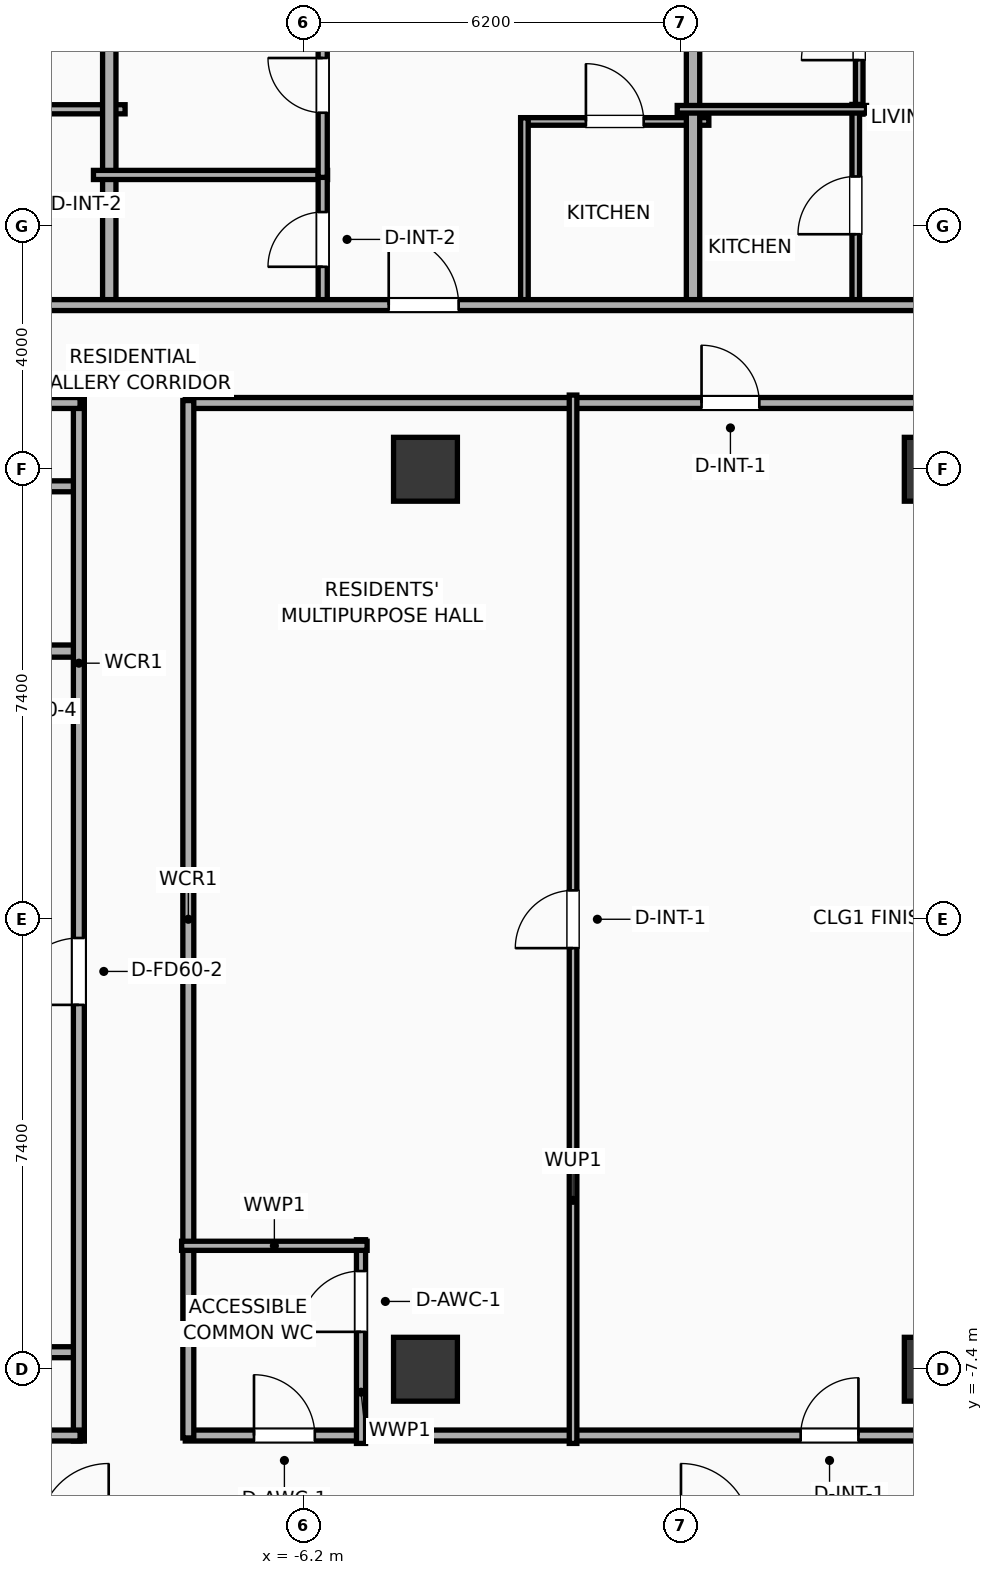
"""IFC4 building model, lengths in metres.
Left out: names, types, materials, properties, quantities, classifications, styles, units other than length and angle.
Written with IfcOpenShell. Run it as: python <this file> out.ifc"""

import sys

from ifc_helpers import new_model, si_unit, direction, frame, frame_2d, origin, origin_2d, place, context, subcontext, project, spatial, rectangle, extrude, element, fill, save


model = new_model("IFC4")
c1 = context("Model", 3, precision=1e-05, world=origin(), true_north=direction((0.0, 1.0)))
c2 = subcontext(c1, "Body", "Model", "MODEL_VIEW")
j1 = project(units=[si_unit("LENGTHUNIT", "METRE"), si_unit("PLANEANGLEUNIT", "RADIAN")], contexts=[c1])
p1 = place(None, origin())
s1 = spatial("IfcSite", under=j1, at=p1, CompositionType="ELEMENT")
p2 = place(p1, origin())
s2 = spatial("IfcBuilding", under=s1, at=p2, CompositionType="ELEMENT")
p3 = place(p2, frame((0.0, 0.0, 101.4)))
s3 = spatial("IfcBuildingStorey", under=s2, at=p3, CompositionType="ELEMENT", Elevation=101.4)
for number, where, z_axis, x_axis in (
    (1, (-4.2, -7.4, 0.0), (0.0, 0.0, 1.0), (1.0, 0.0, 0.0)),
    (2, (-4.2, 7.4, 0.0), (0.0, 0.0, 1.0), (1.0, 0.0, 0.0)),
    (3, (4.2, -7.4, 0.0), (0.0, 0.0, 1.0), (1.0, 0.0, 0.0)),
    (4, (4.2, 7.4, 0.0), (0.0, 0.0, 1.0), (1.0, 0.0, 0.0)),
):
    element("IfcColumn", number, at=place(p3, frame(where, z_axis=z_axis, x_axis=x_axis)), inside=s3, PredefinedType="COLUMN", context=c2, shape_type="SweptSolid", body=[
        extrude(rectangle(XDim=1.05, YDim=1.05, at=origin_2d()), origin(), (0.0, 0.0, 1.0), 3.9),
    ])
p4 = place(p3, frame((-12.15, 4.41, 0.0), z_axis=(0.0, 0.0, 1.0), x_axis=(1.0, 0.0, 0.0)))
e5 = element("IfcWall", 5, at=p4, inside=s3, PredefinedType="PARTITIONING", context=c2, shape_type="SweptSolid", body=[
    extrude(rectangle(XDim=2.27, YDim=0.2, at=frame_2d((1.135, 0.0))), origin(), (0.0, 0.0, 1.0), 3.65),
])
p5 = place(p4, frame((0.685, 0.0, 0.0)))
e6 = element("IfcOpeningElement", 6, at=p5, cuts=e5, PredefinedType="OPENING", context=c2, shape_type="SweptSolid", body=[
    extrude(rectangle(XDim=0.9, YDim=2.05, at=frame_2d((0.45, 1.025))), frame((0.0, 0.11, 0.0), z_axis=(0.0, -1.0, 0.0), x_axis=(1.0, 0.0, 0.0)), (0.0, 0.0, 1.0), 0.22),
])
for number, where, z_axis, x_axis in (
    (7, (-12.15, 7.12, 0.0), (0.0, 0.0, 1.0), (1.0, 0.0, 0.0)),
    (8, (-12.15, -7.12, 0.0), (0.0, 0.0, 1.0), (1.0, 0.0, 0.0)),
):
    element("IfcWall", number, at=place(p3, frame(where, z_axis=z_axis, x_axis=x_axis)), inside=s3, PredefinedType="PARTITIONING", context=c2, shape_type="SweptSolid", body=[
        extrude(rectangle(XDim=2.27, YDim=0.18, at=frame_2d((1.135, 0.0))), origin(), (0.0, 0.0, 1.0), 3.65),
    ])
p6 = place(p3, frame((-9.9, -8.58, 0.0), z_axis=(0.0, 0.0, 1.0), x_axis=(0.0, 1.0, 0.0)))
e9 = element("IfcWall", 9, at=p6, inside=s3, PredefinedType="PARTITIONING", context=c2, shape_type="SweptSolid", body=[
    extrude(rectangle(XDim=17.16, YDim=0.18, at=frame_2d((8.58, 0.0))), origin(), (0.0, 0.0, 1.0), 3.65),
])
p7 = place(p6, frame((7.172, 0.0, 0.0)))
e10 = element("IfcOpeningElement", 10, at=p7, cuts=e9, PredefinedType="OPENING", context=c2, shape_type="SweptSolid", body=[
    extrude(rectangle(XDim=1.1, YDim=2.05, at=frame_2d((0.55, 1.025))), frame((0.0, 0.1, 0.0), z_axis=(0.0, -1.0, 0.0), x_axis=(1.0, 0.0, 0.0)), (0.0, 0.0, 1.0), 0.2),
])
p8 = place(p3, frame((-29.21, 8.49, 0.0), z_axis=(0.0, 0.0, 1.0), x_axis=(1.0, 0.0, 0.0)))
e11 = element("IfcWall", 11, at=p8, inside=s3, PredefinedType="PARTITIONING", context=c2, shape_type="SweptSolid", body=[
    extrude(rectangle(XDim=19.33, YDim=0.18, at=frame_2d((9.665, 0.0))), origin(), (0.0, 0.0, 1.0), 3.65),
])
p9 = place(p8, frame((2.065, 0.0, 0.0)))
e12 = element("IfcOpeningElement", 12, at=p9, cuts=e11, PredefinedType="OPENING", context=c2, shape_type="SweptSolid", body=[
    extrude(rectangle(XDim=1.15, YDim=2.05, at=frame_2d((0.575, 1.025))), frame((0.0, 0.1, 0.0), z_axis=(0.0, -1.0, 0.0), x_axis=(1.0, 0.0, 0.0)), (0.0, 0.0, 1.0), 0.2),
])
p10 = place(p3, frame((-29.21, -8.49, 0.0), z_axis=(0.0, 0.0, 1.0), x_axis=(1.0, 0.0, 0.0)))
e13 = element("IfcWall", 13, at=p10, inside=s3, PredefinedType="PARTITIONING", context=c2, shape_type="SweptSolid", body=[
    extrude(rectangle(XDim=19.33, YDim=0.18, at=frame_2d((9.665, 0.0))), origin(), (0.0, 0.0, 1.0), 3.65),
])
p11 = place(p3, frame((-8.15, 8.49, 0.0), z_axis=(0.0, 0.0, 1.0), x_axis=(1.0, 0.0, 0.0)))
e14 = element("IfcWall", 14, at=p11, inside=s3, PredefinedType="PARTITIONING", context=c2, shape_type="SweptSolid", body=[
    extrude(rectangle(XDim=16.3, YDim=0.18, at=frame_2d((8.15, 0.0))), origin(), (0.0, 0.0, 1.0), 3.65),
])
p12 = place(p11, frame((8.49, 0.0, 0.0)))
e15 = element("IfcOpeningElement", 15, at=p12, cuts=e14, PredefinedType="OPENING", context=c2, shape_type="SweptSolid", body=[
    extrude(rectangle(XDim=0.95, YDim=2.05, at=frame_2d((0.475, 1.025))), frame((0.0, 0.1, 0.0), z_axis=(0.0, -1.0, 0.0), x_axis=(1.0, 0.0, 0.0)), (0.0, 0.0, 1.0), 0.2),
])
p13 = place(p3, frame((-8.15, -8.49, 0.0), z_axis=(0.0, 0.0, 1.0), x_axis=(1.0, 0.0, 0.0)))
e16 = element("IfcWall", 16, at=p13, inside=s3, PredefinedType="PARTITIONING", context=c2, shape_type="SweptSolid", body=[
    extrude(rectangle(XDim=16.3, YDim=0.18, at=frame_2d((8.15, 0.0))), origin(), (0.0, 0.0, 1.0), 3.65),
])
p14 = place(p13, frame((1.13, 0.0, 0.0)))
e17 = element("IfcOpeningElement", 17, at=p14, cuts=e16, PredefinedType="OPENING", context=c2, shape_type="SweptSolid", body=[
    extrude(rectangle(XDim=1.0, YDim=2.05, at=frame_2d((0.5, 1.025))), frame((0.0, 0.1, 0.0), z_axis=(0.0, -1.0, 0.0), x_axis=(1.0, 0.0, 0.0)), (0.0, 0.0, 1.0), 0.2),
])
p15 = place(p13, frame((10.12, 0.0, 0.0)))
e18 = element("IfcOpeningElement", 18, at=p15, cuts=e16, PredefinedType="OPENING", context=c2, shape_type="SweptSolid", body=[
    extrude(rectangle(XDim=0.95, YDim=2.05, at=frame_2d((0.475, 1.025))), frame((0.0, 0.1, 0.0), z_axis=(0.0, -1.0, 0.0), x_axis=(1.0, 0.0, 0.0)), (0.0, 0.0, 1.0), 0.2),
])
p16 = place(p3, frame((-8.1, -8.53, 0.0), z_axis=(0.0, 0.0, 1.0), x_axis=(0.0, 1.0, 0.0)))
e19 = element("IfcWall", 19, at=p16, inside=s3, PredefinedType="PARTITIONING", context=c2, shape_type="SweptSolid", body=[
    extrude(rectangle(XDim=17.06, YDim=0.18, at=frame_2d((8.53, 0.0))), origin(), (0.0, 0.0, 1.0), 3.65),
])
p17 = place(p3, frame((-5.26, -8.62, 0.0), z_axis=(0.0, 0.0, 1.0), x_axis=(0.0, 1.0, 0.0)))
e20 = element("IfcWall", 20, at=p17, inside=s3, PredefinedType="PLUMBINGWALL", context=c2, shape_type="SweptSolid", body=[
    extrude(rectangle(XDim=3.35, YDim=0.15, at=frame_2d((1.675, 0.0))), origin(), (0.0, 0.0, 1.0), 3.65),
])
p18 = place(p17, frame((1.835, 0.0, 0.0)))
e21 = element("IfcOpeningElement", 21, at=p18, cuts=e20, PredefinedType="OPENING", context=c2, shape_type="SweptSolid", body=[
    extrude(rectangle(XDim=1.0, YDim=2.05, at=frame_2d((0.5, 1.025))), frame((0.0, 0.085, 0.0), z_axis=(0.0, -1.0, 0.0), x_axis=(1.0, 0.0, 0.0)), (0.0, 0.0, 1.0), 0.17),
])
p19 = place(p3, frame((-8.21, -5.37, 0.0), z_axis=(0.0, 0.0, 1.0), x_axis=(1.0, 0.0, 0.0)))
e22 = element("IfcWall", 22, at=p19, inside=s3, PredefinedType="PLUMBINGWALL", context=c2, shape_type="SweptSolid", body=[
    extrude(rectangle(XDim=3.05, YDim=0.15, at=frame_2d((1.525, 0.0))), origin(), (0.0, 0.0, 1.0), 3.65),
])
p20 = place(p3, frame((-1.773, -8.62, 0.0), z_axis=(0.0, 0.0, 1.0), x_axis=(0.0, 1.0, 0.0)))
e23 = element("IfcWall", 23, at=p20, inside=s3, PredefinedType="PARTITIONING", context=c2, shape_type="SweptSolid", body=[
    extrude(rectangle(XDim=17.24, YDim=0.125, at=frame_2d((8.62, 0.0))), origin(), (0.0, 0.0, 1.0), 3.65),
])
p21 = place(p20, frame((8.145, 0.0, 0.0)))
e24 = element("IfcOpeningElement", 24, at=p21, cuts=e23, PredefinedType="OPENING", context=c2, shape_type="SweptSolid", body=[
    extrude(rectangle(XDim=0.95, YDim=2.05, at=frame_2d((0.475, 1.025))), frame((0.0, 0.073, 0.0), z_axis=(0.0, -1.0, 0.0), x_axis=(1.0, 0.0, 0.0)), (0.0, 0.0, 1.0), 0.145),
])
p22 = place(p3, frame((-12.93, 13.32, 0.0), z_axis=(0.0, 0.0, 1.0), x_axis=(1.0, 0.0, 0.0)))
e25 = element("IfcWall", 25, at=p22, inside=s3, PredefinedType="PLUMBINGWALL", context=c2, shape_type="SweptSolid", body=[
    extrude(rectangle(XDim=3.79, YDim=0.15, at=frame_2d((1.895, 0.0))), origin(), (0.0, 0.0, 1.0), 3.65),
])
p23 = place(p3, frame((-9.4, 10.02, 0.0), z_axis=(0.0, 0.0, 1.0), x_axis=(0.0, 1.0, 0.0)))
e26 = element("IfcWall", 26, at=p23, inside=s3, PredefinedType="PARTITIONING", context=c2, shape_type="SweptSolid", body=[
    extrude(rectangle(XDim=11.59, YDim=0.22, at=frame_2d((5.795, 0.0))), origin(), (0.0, 0.0, 1.0), 3.65),
])
p24 = place(p3, frame((-9.66, 12.24, 0.0), z_axis=(0.0, 0.0, 1.0), x_axis=(1.0, 0.0, 0.0)))
e27 = element("IfcWall", 27, at=p24, inside=s3, PredefinedType="PLUMBINGWALL", context=c2, shape_type="SweptSolid", body=[
    extrude(rectangle(XDim=3.85, YDim=0.15, at=frame_2d((1.925, 0.0))), origin(), (0.0, 0.0, 1.0), 3.65),
])
p25 = place(p3, frame((-5.89, 10.08, 0.0), z_axis=(0.0, 0.0, 1.0), x_axis=(0.0, 1.0, 0.0)))
e28 = element("IfcWall", 28, at=p25, inside=s3, PredefinedType="PLUMBINGWALL", context=c2, shape_type="SweptSolid", body=[
    extrude(rectangle(XDim=2.2, YDim=0.15, at=frame_2d((1.1, 0.0))), origin(), (0.0, 0.0, 1.0), 3.65),
])
p26 = place(p25, frame((0.65, 0.0, 0.0)))
e29 = element("IfcOpeningElement", 29, at=p26, cuts=e28, PredefinedType="OPENING", context=c2, shape_type="SweptSolid", body=[
    extrude(rectangle(XDim=0.9, YDim=2.05, at=frame_2d((0.45, 1.025))), frame((0.0, 0.085, 0.0), z_axis=(0.0, -1.0, 0.0), x_axis=(1.0, 0.0, 0.0)), (0.0, 0.0, 1.0), 0.17),
])
p27 = place(p3, frame((-5.89, 12.2, 0.0), z_axis=(0.0, 0.0, 1.0), x_axis=(0.0, 1.0, 0.0)))
e30 = element("IfcWall", 30, at=p27, inside=s3, PredefinedType="PLUMBINGWALL", context=c2, shape_type="SweptSolid", body=[
    extrude(rectangle(XDim=9.458, YDim=0.15, at=frame_2d((4.729, 0.0))), origin(), (0.0, 0.0, 1.0), 3.65),
])
p28 = place(p27, frame((1.063, 0.0, 0.0)))
e31 = element("IfcOpeningElement", 31, at=p28, cuts=e30, PredefinedType="OPENING", context=c2, shape_type="SweptSolid", body=[
    extrude(rectangle(XDim=0.9, YDim=2.05, at=frame_2d((0.45, 1.025))), frame((0.0, 0.085, 0.0), z_axis=(0.0, -1.0, 0.0), x_axis=(1.0, 0.0, 0.0)), (0.0, 0.0, 1.0), 0.17),
])
p29 = place(p3, frame((-2.633, 13.12, 0.0), z_axis=(0.0, 0.0, 1.0), x_axis=(1.0, 0.0, 0.0)))
e32 = element("IfcWall", 32, at=p29, inside=s3, PredefinedType="PARTITIONING", context=c2, shape_type="SweptSolid", body=[
    extrude(rectangle(XDim=3.093, YDim=0.125, at=frame_2d((1.546, 0.0))), origin(), (0.0, 0.0, 1.0), 3.65),
])
p30 = place(p29, frame((1.072, 0.0, 0.0)))
e33 = element("IfcOpeningElement", 33, at=p30, cuts=e32, PredefinedType="OPENING", context=c2, shape_type="SweptSolid", body=[
    extrude(rectangle(XDim=0.95, YDim=2.05, at=frame_2d((0.475, 1.025))), frame((0.0, 0.073, 0.0), z_axis=(0.0, -1.0, 0.0), x_axis=(1.0, 0.0, 0.0)), (0.0, 0.0, 1.0), 0.145),
])
p31 = place(p3, frame((-2.573, 10.08, 0.0), z_axis=(0.0, 0.0, 1.0), x_axis=(0.0, 1.0, 0.0)))
e34 = element("IfcWall", 34, at=p31, inside=s3, PredefinedType="PARTITIONING", context=c2, shape_type="SweptSolid", body=[
    extrude(rectangle(XDim=3.1, YDim=0.125, at=frame_2d((1.55, 0.0))), origin(), (0.0, 0.0, 1.0), 3.65),
])
p32 = place(p3, frame((0.2, 10.02, 0.0), z_axis=(0.0, 0.0, 1.0), x_axis=(0.0, 1.0, 0.0)))
e35 = element("IfcWall", 35, at=p32, inside=s3, PredefinedType="PARTITIONING", context=c2, shape_type="SweptSolid", body=[
    extrude(rectangle(XDim=11.59, YDim=0.22, at=frame_2d((5.795, 0.0))), origin(), (0.0, 0.0, 1.0), 3.65),
])
p33 = place(p3, frame((2.933, 13.24, 0.0), z_axis=(0.0, 0.0, 1.0), x_axis=(0.0, 1.0, 0.0)))
e36 = element("IfcWall", 36, at=p33, inside=s3, PredefinedType="PARTITIONING", context=c2, shape_type="SweptSolid", body=[
    extrude(rectangle(XDim=8.52, YDim=0.125, at=frame_2d((4.26, 0.0))), origin(), (0.0, 0.0, 1.0), 3.65),
])
p34 = place(p33, frame((0.888, 0.0, 0.0)))
e37 = element("IfcOpeningElement", 37, at=p34, cuts=e36, PredefinedType="OPENING", context=c2, shape_type="SweptSolid", body=[
    extrude(rectangle(XDim=0.95, YDim=2.05, at=frame_2d((0.475, 1.025))), frame((0.0, 0.073, 0.0), z_axis=(0.0, -1.0, 0.0), x_axis=(1.0, 0.0, 0.0)), (0.0, 0.0, 1.0), 0.145),
])
p35 = place(p3, frame((2.876, 10.08, 0.0), z_axis=(0.0, 0.0, 1.0), x_axis=(0.0, 1.0, 0.0)))
e38 = element("IfcWall", 38, at=p35, inside=s3, PredefinedType="PARTITIONING", context=c2, shape_type="SweptSolid", body=[
    extrude(rectangle(XDim=3.32, YDim=0.125, at=frame_2d((1.66, 0.0))), origin(), (0.0, 0.0, 1.0), 3.65),
])
p36 = place(p35, frame((1.185, 0.0, 0.0)))
e39 = element("IfcOpeningElement", 39, at=p36, cuts=e38, PredefinedType="OPENING", context=c2, shape_type="SweptSolid", body=[
    extrude(rectangle(XDim=0.95, YDim=2.05, at=frame_2d((0.475, 1.025))), frame((0.0, 0.073, 0.0), z_axis=(0.0, -1.0, 0.0), x_axis=(1.0, 0.0, 0.0)), (0.0, 0.0, 1.0), 0.145),
])
p37 = place(p3, frame((-0.06, 13.32, 0.0), z_axis=(0.0, 0.0, 1.0), x_axis=(1.0, 0.0, 0.0)))
e40 = element("IfcWall", 40, at=p37, inside=s3, PredefinedType="PARTITIONING", context=c2, shape_type="SweptSolid", body=[
    extrude(rectangle(XDim=3.113, YDim=0.125, at=frame_2d((1.557, 0.0))), origin(), (0.0, 0.0, 1.0), 3.65),
])
p38 = place(p3, frame((-29.21, 10.1, 0.0), z_axis=(0.0, 0.0, 1.0), x_axis=(1.0, 0.0, 0.0)))
e41 = element("IfcWall", 41, at=p38, inside=s3, PredefinedType="PARTITIONING", context=c2, shape_type="SweptSolid", body=[
    extrude(rectangle(XDim=62.42, YDim=0.18, at=frame_2d((31.21, 0.0))), origin(), (0.0, 0.0, 1.0), 3.65),
])
p39 = place(p38, frame((4.906, 0.0, 0.0)))
e42 = element("IfcOpeningElement", 42, at=p39, cuts=e41, PredefinedType="OPENING", context=c2, shape_type="SweptSolid", body=[
    extrude(rectangle(XDim=1.15, YDim=2.05, at=frame_2d((0.575, 1.025))), frame((0.0, 0.1, 0.0), z_axis=(0.0, -1.0, 0.0), x_axis=(1.0, 0.0, 0.0)), (0.0, 0.0, 1.0), 0.2),
])
p40 = place(p38, frame((14.812, 0.0, 0.0)))
e43 = element("IfcOpeningElement", 43, at=p40, cuts=e41, PredefinedType="OPENING", context=c2, shape_type="SweptSolid", body=[
    extrude(rectangle(XDim=1.15, YDim=2.05, at=frame_2d((0.575, 1.025))), frame((0.0, 0.1, 0.0), z_axis=(0.0, -1.0, 0.0), x_axis=(1.0, 0.0, 0.0)), (0.0, 0.0, 1.0), 0.2),
])
p41 = place(p38, frame((24.406, 0.0, 0.0)))
e44 = element("IfcOpeningElement", 44, at=p41, cuts=e41, PredefinedType="OPENING", context=c2, shape_type="SweptSolid", body=[
    extrude(rectangle(XDim=1.15, YDim=2.05, at=frame_2d((0.575, 1.025))), frame((0.0, 0.1, 0.0), z_axis=(0.0, -1.0, 0.0), x_axis=(1.0, 0.0, 0.0)), (0.0, 0.0, 1.0), 0.2),
])
p42 = place(p38, frame((33.981, 0.0, 0.0)))
e45 = element("IfcOpeningElement", 45, at=p42, cuts=e41, PredefinedType="OPENING", context=c2, shape_type="SweptSolid", body=[
    extrude(rectangle(XDim=1.15, YDim=2.05, at=frame_2d((0.575, 1.025))), frame((0.0, 0.1, 0.0), z_axis=(0.0, -1.0, 0.0), x_axis=(1.0, 0.0, 0.0)), (0.0, 0.0, 1.0), 0.2),
])
p43 = place(p38, frame((43.138, 0.0, 0.0)))
e46 = element("IfcOpeningElement", 46, at=p43, cuts=e41, PredefinedType="OPENING", context=c2, shape_type="SweptSolid", body=[
    extrude(rectangle(XDim=1.15, YDim=2.05, at=frame_2d((0.575, 1.025))), frame((0.0, 0.1, 0.0), z_axis=(0.0, -1.0, 0.0), x_axis=(1.0, 0.0, 0.0)), (0.0, 0.0, 1.0), 0.2),
])
p44 = place(p38, frame((51.777, 0.0, 0.0)))
e47 = element("IfcOpeningElement", 47, at=p44, cuts=e41, PredefinedType="OPENING", context=c2, shape_type="SweptSolid", body=[
    extrude(rectangle(XDim=0.9, YDim=2.05, at=frame_2d((0.45, 1.025))), frame((0.0, 0.1, 0.0), z_axis=(0.0, -1.0, 0.0), x_axis=(1.0, 0.0, 0.0)), (0.0, 0.0, 1.0), 0.2),
])
p45 = place(p38, frame((58.718, 0.0, 0.0)))
e48 = element("IfcOpeningElement", 48, at=p45, cuts=e41, PredefinedType="OPENING", context=c2, shape_type="SweptSolid", body=[
    extrude(rectangle(XDim=0.9, YDim=2.05, at=frame_2d((0.45, 1.025))), frame((0.0, 0.1, 0.0), z_axis=(0.0, -1.0, 0.0), x_axis=(1.0, 0.0, 0.0)), (0.0, 0.0, 1.0), 0.2),
])
p46 = place(p7, origin())
e49 = element("IfcDoor", 49, at=p46, inside=s3, OperationType="SINGLE_SWING_LEFT", PredefinedType="DOOR", context=c2, shape_type="SweptSolid", body=[
    extrude(rectangle(XDim=1.1, YDim=2.05, at=frame_2d((0.55, 1.025))), frame((0.0, 0.025, 0.0), z_axis=(0.0, -1.0, 0.0), x_axis=(1.0, 0.0, 0.0)), (0.0, 0.0, 1.0), 0.05),
])
fill(e10, e49)
p47 = place(p12, origin())
e50 = element("IfcDoor", 50, at=p47, inside=s3, OperationType="SINGLE_SWING_LEFT", PredefinedType="DOOR", context=c2, shape_type="SweptSolid", body=[
    extrude(rectangle(XDim=0.95, YDim=2.05, at=frame_2d((0.475, 1.025))), frame((0.0, 0.025, 0.0), z_axis=(0.0, -1.0, 0.0), x_axis=(1.0, 0.0, 0.0)), (0.0, 0.0, 1.0), 0.05),
])
fill(e15, e50)
p48 = place(p14, origin())
e51 = element("IfcDoor", 51, at=p48, inside=s3, OperationType="SINGLE_SWING_LEFT", PredefinedType="DOOR", context=c2, shape_type="SweptSolid", body=[
    extrude(rectangle(XDim=1.0, YDim=2.05, at=frame_2d((0.5, 1.025))), frame((0.0, 0.025, 0.0), z_axis=(0.0, -1.0, 0.0), x_axis=(1.0, 0.0, 0.0)), (0.0, 0.0, 1.0), 0.05),
])
fill(e17, e51)
p49 = place(p15, origin())
e52 = element("IfcDoor", 52, at=p49, inside=s3, OperationType="SINGLE_SWING_RIGHT", PredefinedType="DOOR", context=c2, shape_type="SweptSolid", body=[
    extrude(rectangle(XDim=0.95, YDim=2.05, at=frame_2d((0.475, 1.025))), frame((0.0, 0.025, 0.0), z_axis=(0.0, -1.0, 0.0), x_axis=(1.0, 0.0, 0.0)), (0.0, 0.0, 1.0), 0.05),
])
fill(e18, e52)
p50 = place(p18, origin())
e53 = element("IfcDoor", 53, at=p50, inside=s3, OperationType="SINGLE_SWING_LEFT", PredefinedType="DOOR", context=c2, shape_type="SweptSolid", body=[
    extrude(rectangle(XDim=1.0, YDim=2.05, at=frame_2d((0.5, 1.025))), frame((0.0, 0.025, 0.0), z_axis=(0.0, -1.0, 0.0), x_axis=(1.0, 0.0, 0.0)), (0.0, 0.0, 1.0), 0.05),
])
fill(e21, e53)
p51 = place(p21, origin())
e54 = element("IfcDoor", 54, at=p51, inside=s3, OperationType="SINGLE_SWING_LEFT", PredefinedType="DOOR", context=c2, shape_type="SweptSolid", body=[
    extrude(rectangle(XDim=0.95, YDim=2.05, at=frame_2d((0.475, 1.025))), frame((0.0, 0.025, 0.0), z_axis=(0.0, -1.0, 0.0), x_axis=(1.0, 0.0, 0.0)), (0.0, 0.0, 1.0), 0.05),
])
fill(e24, e54)
p52 = place(p26, origin())
e55 = element("IfcDoor", 55, at=p52, inside=s3, OperationType="SINGLE_SWING_LEFT", PredefinedType="DOOR", context=c2, shape_type="SweptSolid", body=[
    extrude(rectangle(XDim=0.9, YDim=2.05, at=frame_2d((0.45, 1.025))), frame((0.0, 0.025, 0.0), z_axis=(0.0, -1.0, 0.0), x_axis=(1.0, 0.0, 0.0)), (0.0, 0.0, 1.0), 0.05),
])
fill(e29, e55)
p53 = place(p28, origin())
e56 = element("IfcDoor", 56, at=p53, inside=s3, OperationType="SINGLE_SWING_RIGHT", PredefinedType="DOOR", context=c2, shape_type="SweptSolid", body=[
    extrude(rectangle(XDim=0.9, YDim=2.05, at=frame_2d((0.45, 1.025))), frame((0.0, 0.025, 0.0), z_axis=(0.0, -1.0, 0.0), x_axis=(1.0, 0.0, 0.0)), (0.0, 0.0, 1.0), 0.05),
])
fill(e31, e56)
p54 = place(p30, origin())
e57 = element("IfcDoor", 57, at=p54, inside=s3, OperationType="SINGLE_SWING_LEFT", PredefinedType="DOOR", context=c2, shape_type="SweptSolid", body=[
    extrude(rectangle(XDim=0.95, YDim=2.05, at=frame_2d((0.475, 1.025))), frame((0.0, 0.025, 0.0), z_axis=(0.0, -1.0, 0.0), x_axis=(1.0, 0.0, 0.0)), (0.0, 0.0, 1.0), 0.05),
])
fill(e33, e57)
p55 = place(p34, origin())
e58 = element("IfcDoor", 58, at=p55, inside=s3, OperationType="SINGLE_SWING_LEFT", PredefinedType="DOOR", context=c2, shape_type="SweptSolid", body=[
    extrude(rectangle(XDim=0.95, YDim=2.05, at=frame_2d((0.475, 1.025))), frame((0.0, 0.025, 0.0), z_axis=(0.0, -1.0, 0.0), x_axis=(1.0, 0.0, 0.0)), (0.0, 0.0, 1.0), 0.05),
])
fill(e37, e58)
p56 = place(p36, origin())
e59 = element("IfcDoor", 59, at=p56, inside=s3, OperationType="SINGLE_SWING_LEFT", PredefinedType="DOOR", context=c2, shape_type="SweptSolid", body=[
    extrude(rectangle(XDim=0.95, YDim=2.05, at=frame_2d((0.475, 1.025))), frame((0.0, 0.025, 0.0), z_axis=(0.0, -1.0, 0.0), x_axis=(1.0, 0.0, 0.0)), (0.0, 0.0, 1.0), 0.05),
])
fill(e39, e59)
p57 = place(p41, origin())
e60 = element("IfcDoor", 60, at=p57, inside=s3, OperationType="SINGLE_SWING_LEFT", PredefinedType="DOOR", context=c2, shape_type="SweptSolid", body=[
    extrude(rectangle(XDim=1.15, YDim=2.05, at=frame_2d((0.575, 1.025))), frame((0.0, 0.025, 0.0), z_axis=(0.0, -1.0, 0.0), x_axis=(1.0, 0.0, 0.0)), (0.0, 0.0, 1.0), 0.05),
])
fill(e44, e60)
save(model, sys.argv[1])
